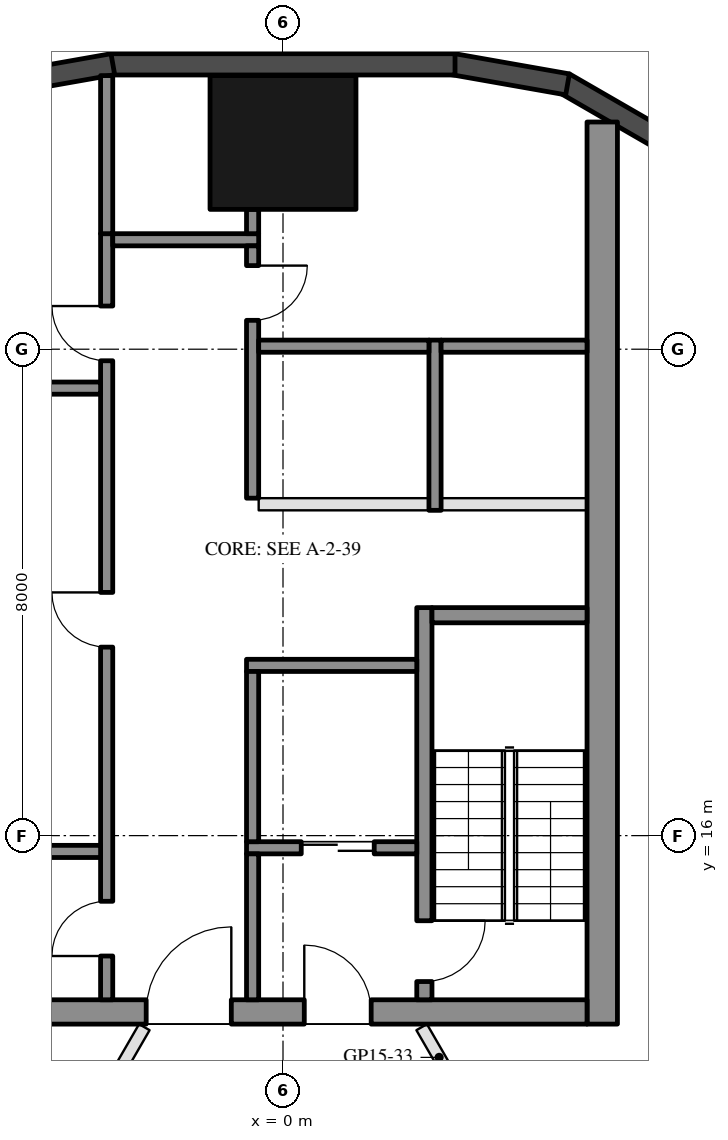
"""IFC4 building model, lengths in metres.
Left out: names, types, materials, properties, quantities, classifications, styles, units other than length and angle.
Written with IfcOpenShell. Run it as: python <this file> out.ifc"""

import sys

from ifc_helpers import new_model, si_unit, direction, frame, frame_2d, origin, origin_2d, place, context, subcontext, project, spatial, rectangle, hollow_rectangle, extrude, element, fill, save


model = new_model("IFC4")
c1 = context("Model", 3, precision=1e-05, world=origin(), true_north=direction((0.0, 1.0)))
c2 = subcontext(c1, "Body", "Model", "MODEL_VIEW")
j1 = project(units=[si_unit("LENGTHUNIT", "METRE"), si_unit("PLANEANGLEUNIT", "RADIAN")], contexts=[c1])
p1 = place(None, origin())
s1 = spatial("IfcSite", under=j1, at=p1, CompositionType="ELEMENT")
p2 = place(p1, origin())
s2 = spatial("IfcBuilding", under=s1, at=p2, CompositionType="ELEMENT")
p3 = place(p2, frame((0.0, 0.0, 168.8)))
s3 = spatial("IfcBuildingStorey", under=s2, at=p3, CompositionType="ELEMENT", Elevation=168.8)
p4 = place(p3, frame((0.0, 27.4, 0.0), z_axis=(0.0, 0.0, 1.0), x_axis=(1.0, 0.0, 0.0)))
e1 = element("IfcColumn", 1, at=p4, inside=s3, PredefinedType="COLUMN", context=c2, shape_type="SweptSolid", body=[
    extrude(hollow_rectangle(XDim=2.4, YDim=2.2, WallThickness=0.06, at=origin_2d()), origin(), (0.0, 0.0, 1.0), 3.7),
])
for number, where, z_axis, x_axis in (
    (2, (6.277, 27.422, 0.0), (0.0, 0.0, 1.0), (-0.866, 0.5, 0.0)),
    (3, (4.68, 28.356, 0.0), (0.0, 0.0, 1.0), (-0.985, 0.174, 0.0)),
):
    element("IfcWall", number, at=place(p3, frame(where, z_axis=z_axis, x_axis=x_axis)), inside=s3, PredefinedType="SOLIDWALL", context=c2, shape_type="SweptSolid", body=[
        extrude(rectangle(XDim=1.91, YDim=0.35, at=frame_2d((0.955, 0.0))), origin(), (0.0, 0.0, 1.0), 3.55),
    ])
p5 = place(p3, frame((2.829, 28.685, 0.0), z_axis=(0.0, 0.0, 1.0), x_axis=(-1.0, 0.0, 0.0)))
e4 = element("IfcWall", 4, at=p5, inside=s3, PredefinedType="SOLIDWALL", context=c2, shape_type="SweptSolid", body=[
    extrude(rectangle(XDim=5.658, YDim=0.35, at=frame_2d((2.829, 0.0))), origin(), (0.0, 0.0, 1.0), 3.55),
])
p6 = place(p3, frame((-2.799, 28.688, 0.0), z_axis=(0.0, 0.0, 1.0), x_axis=(-0.984798995425, -0.173697837091, 0.0)))
e5 = element("IfcWall", 5, at=p6, inside=s3, PredefinedType="SOLIDWALL", context=c2, shape_type="SweptSolid", body=[
    extrude(rectangle(XDim=1.91, YDim=0.35, at=frame_2d((0.955, 0.0))), origin(), (0.0, 0.0, 1.0), 3.55),
])
p7 = place(p3, frame((5.25, 12.9, 0.0), z_axis=(0.0, 0.0, 1.0), x_axis=(0.0, 1.0, 0.0)))
e6 = element("IfcWall", 6, at=p7, inside=s3, PredefinedType="SHEAR", context=c2, shape_type="SweptSolid", body=[
    extrude(rectangle(XDim=14.837, YDim=0.5, at=frame_2d((7.418, 0.0))), origin(), (0.0, 0.0, 1.0), 3.5),
])
p8 = place(p3, frame((5.0, 13.1, 0.0), z_axis=(0.0, 0.0, 1.0), x_axis=(-1.0, 0.0, 0.0)))
e7 = element("IfcWall", 7, at=p8, inside=s3, PredefinedType="SHEAR", context=c2, shape_type="SweptSolid", body=[
    extrude(rectangle(XDim=10.0, YDim=0.4, at=frame_2d((5.0, 0.0))), origin(), (0.0, 0.0, 1.0), 3.5),
])
p9 = place(p8, frame((3.55, 0.0, 0.0)))
e8 = element("IfcOpeningElement", 8, at=p9, cuts=e7, PredefinedType="OPENING", context=c2, shape_type="SweptSolid", body=[
    extrude(rectangle(XDim=1.1, YDim=2.1, at=frame_2d((0.55, 1.05))), frame((0.0, 0.21, 0.0), z_axis=(0.0, -1.0, 0.0), x_axis=(1.0, 0.0, 0.0)), (0.0, 0.0, 1.0), 0.42),
])
p10 = place(p8, frame((5.85, 0.0, 0.0)))
e9 = element("IfcOpeningElement", 9, at=p10, cuts=e7, PredefinedType="OPENING", context=c2, shape_type="SweptSolid", body=[
    extrude(rectangle(XDim=1.4, YDim=2.1, at=frame_2d((0.7, 1.05))), frame((0.0, 0.21, 0.0), z_axis=(0.0, -1.0, 0.0), x_axis=(1.0, 0.0, 0.0)), (0.0, 0.0, 1.0), 0.42),
])
p11 = place(p3, frame((2.325, 13.3, 0.0), z_axis=(0.0, 0.0, 1.0), x_axis=(0.0, 1.0, 0.0)))
e10 = element("IfcWall", 10, at=p11, inside=s3, PredefinedType="SHEAR", context=c2, shape_type="SweptSolid", body=[
    extrude(rectangle(XDim=6.45, YDim=0.25, at=frame_2d((3.225, 0.0))), origin(), (0.0, 0.0, 1.0), 3.5),
])
p12 = place(p11, frame((0.3, 0.0, 0.0)))
e11 = element("IfcOpeningElement", 11, at=p12, cuts=e10, PredefinedType="OPENING", context=c2, shape_type="SweptSolid", body=[
    extrude(rectangle(XDim=1.0, YDim=2.1, at=frame_2d((0.5, 1.05))), frame((0.0, 0.135, 0.0), z_axis=(0.0, -1.0, 0.0), x_axis=(1.0, 0.0, 0.0)), (0.0, 0.0, 1.0), 0.27),
])
p13 = place(p3, frame((5.0, 19.625, 0.0), z_axis=(0.0, 0.0, 1.0), x_axis=(-1.0, 0.0, 0.0)))
e12 = element("IfcWall", 12, at=p13, inside=s3, PredefinedType="SHEAR", context=c2, shape_type="SweptSolid", body=[
    extrude(rectangle(XDim=2.55, YDim=0.25, at=frame_2d((1.275, 0.0))), origin(), (0.0, 0.0, 1.0), 3.5),
])
p14 = place(p3, frame((2.2, 18.8, 0.0), z_axis=(0.0, 0.0, 1.0), x_axis=(-1.0, 0.0, 0.0)))
e13 = element("IfcWall", 13, at=p14, inside=s3, PredefinedType="SHEAR", context=c2, shape_type="SweptSolid", body=[
    extrude(rectangle(XDim=2.8, YDim=0.2, at=frame_2d((1.4, 0.0))), origin(), (0.0, 0.0, 1.0), 3.5),
])
p15 = place(p3, frame((2.2, 15.8, 0.0), z_axis=(0.0, 0.0, 1.0), x_axis=(-1.0, 0.0, 0.0)))
e14 = element("IfcWall", 14, at=p15, inside=s3, PredefinedType="SHEAR", context=c2, shape_type="SweptSolid", body=[
    extrude(rectangle(XDim=2.8, YDim=0.2, at=frame_2d((1.4, 0.0))), origin(), (0.0, 0.0, 1.0), 3.5),
])
p16 = place(p15, frame((0.7, 0.0, 0.0)))
e15 = element("IfcOpeningElement", 15, at=p16, cuts=e14, PredefinedType="OPENING", context=c2, shape_type="SweptSolid", body=[
    extrude(rectangle(XDim=1.2, YDim=2.1, at=frame_2d((0.6, 1.05))), frame((0.0, 0.11, 0.0), z_axis=(0.0, -1.0, 0.0), x_axis=(1.0, 0.0, 0.0)), (0.0, 0.0, 1.0), 0.22),
])
p17 = place(p3, frame((-0.5, 15.9, 0.0), z_axis=(0.0, 0.0, 1.0), x_axis=(0.0, 1.0, 0.0)))
e16 = element("IfcWall", 16, at=p17, inside=s3, PredefinedType="SHEAR", context=c2, shape_type="SweptSolid", body=[
    extrude(rectangle(XDim=2.8, YDim=0.2, at=frame_2d((1.4, 0.0))), origin(), (0.0, 0.0, 1.0), 3.5),
])
p18 = place(p3, frame((-0.5, 13.3, 0.0), z_axis=(0.0, 0.0, 1.0), x_axis=(0.0, 1.0, 0.0)))
e17 = element("IfcWall", 17, at=p18, inside=s3, PredefinedType="SHEAR", context=c2, shape_type="SweptSolid", body=[
    extrude(rectangle(XDim=2.4, YDim=0.2, at=frame_2d((1.2, 0.0))), origin(), (0.0, 0.0, 1.0), 3.5),
])
p19 = place(p3, frame((-2.9, 13.3, 0.0), z_axis=(0.0, 0.0, 1.0), x_axis=(0.0, 1.0, 0.0)))
e18 = element("IfcWall", 18, at=p19, inside=s3, PredefinedType="SHEAR", context=c2, shape_type="SweptSolid", body=[
    extrude(rectangle(XDim=12.6, YDim=0.2, at=frame_2d((6.3, 0.0))), origin(), (0.0, 0.0, 1.0), 3.5),
])
p20 = place(p19, frame((0.72, 0.0, 0.0)))
e19 = element("IfcOpeningElement", 19, at=p20, cuts=e18, PredefinedType="OPENING", context=c2, shape_type="SweptSolid", body=[
    extrude(rectangle(XDim=0.9, YDim=2.1, at=frame_2d((0.45, 1.05))), frame((0.0, 0.11, 0.0), z_axis=(0.0, -1.0, 0.0), x_axis=(1.0, 0.0, 0.0)), (0.0, 0.0, 1.0), 0.22),
])
p21 = place(p19, frame((5.8, 0.0, 0.0)))
e20 = element("IfcOpeningElement", 20, at=p21, cuts=e18, PredefinedType="OPENING", context=c2, shape_type="SweptSolid", body=[
    extrude(rectangle(XDim=0.9, YDim=2.1, at=frame_2d((0.45, 1.05))), frame((0.0, 0.11, 0.0), z_axis=(0.0, -1.0, 0.0), x_axis=(1.0, 0.0, 0.0)), (0.0, 0.0, 1.0), 0.22),
])
p22 = place(p19, frame((10.51, 0.0, 0.0)))
e21 = element("IfcOpeningElement", 21, at=p22, cuts=e18, PredefinedType="OPENING", context=c2, shape_type="SweptSolid", body=[
    extrude(rectangle(XDim=0.9, YDim=2.1, at=frame_2d((0.45, 1.05))), frame((0.0, 0.11, 0.0), z_axis=(0.0, -1.0, 0.0), x_axis=(1.0, 0.0, 0.0)), (0.0, 0.0, 1.0), 0.22),
])
p23 = place(p3, frame((-0.4, 25.8, 0.0), z_axis=(0.0, 0.0, 1.0), x_axis=(-1.0, 0.0, 0.0)))
e22 = element("IfcWall", 22, at=p23, inside=s3, PredefinedType="SHEAR", context=c2, shape_type="SweptSolid", body=[
    extrude(rectangle(XDim=2.4, YDim=0.2, at=frame_2d((1.2, 0.0))), origin(), (0.0, 0.0, 1.0), 3.5),
])
p24 = place(p3, frame((-0.5, 21.55, 0.0), z_axis=(0.0, 0.0, 1.0), x_axis=(0.0, 1.0, 0.0)))
e23 = element("IfcWall", 23, at=p24, inside=s3, PredefinedType="SHEAR", context=c2, shape_type="SweptSolid", body=[
    extrude(rectangle(XDim=4.15, YDim=0.2, at=frame_2d((2.075, 0.0))), origin(), (0.0, 0.0, 1.0), 3.5),
])
p25 = place(p24, frame((2.925, 0.0, 0.0)))
e24 = element("IfcOpeningElement", 24, at=p25, cuts=e23, PredefinedType="OPENING", context=c2, shape_type="SweptSolid", body=[
    extrude(rectangle(XDim=0.9, YDim=2.1, at=frame_2d((0.45, 1.05))), frame((0.0, 0.11, 0.0), z_axis=(0.0, -1.0, 0.0), x_axis=(1.0, 0.0, 0.0)), (0.0, 0.0, 1.0), 0.22),
])
for number, where, z_axis, x_axis in (
    (25, (-3.0, 15.74, 0.0), (0.0, 0.0, 1.0), (-1.0, 0.0, 0.0)),
    (26, (-3.0, 23.36, 0.0), (0.0, 0.0, 1.0), (-1.0, 0.0, 0.0)),
):
    element("IfcWall", number, at=place(p3, frame(where, z_axis=z_axis, x_axis=x_axis)), inside=s3, PredefinedType="SHEAR", context=c2, shape_type="SweptSolid", body=[
        extrude(rectangle(XDim=2.0, YDim=0.2, at=frame_2d((1.0, 0.0))), origin(), (0.0, 0.0, 1.0), 3.5),
    ])
p26 = place(p3, frame((-0.5, 25.9, 0.0), z_axis=(0.0, 0.0, 1.0), x_axis=(0.0, 1.0, 0.0)))
e27 = element("IfcWall", 27, at=p26, inside=s3, PredefinedType="SHEAR", context=c2, shape_type="SweptSolid", body=[
    extrude(rectangle(XDim=0.4, YDim=0.2, at=frame_2d((0.2, 0.0))), origin(), (0.0, 0.0, 1.0), 3.5),
])
p27 = place(p3, frame((-2.9, 25.9, 0.0), z_axis=(0.0, 0.0, 1.0), x_axis=(0.0, 1.0, 0.0)))
e28 = element("IfcWall", 28, at=p27, inside=s3, PredefinedType="SHEAR", context=c2, shape_type="SweptSolid", body=[
    extrude(rectangle(XDim=2.6, YDim=0.2, at=frame_2d((1.3, 0.0))), origin(), (0.0, 0.0, 1.0), 3.5),
])
p28 = place(p3, frame((2.5, 21.35, 0.0), z_axis=(0.0, 0.0, 1.0), x_axis=(0.0, 1.0, 0.0)))
e29 = element("IfcWall", 29, at=p28, inside=s3, PredefinedType="SHEAR", context=c2, shape_type="SweptSolid", body=[
    extrude(rectangle(XDim=2.8, YDim=0.2, at=frame_2d((1.4, 0.0))), origin(), (0.0, 0.0, 1.0), 3.5),
])
p29 = place(p3, frame((5.0, 24.05, 0.0), z_axis=(0.0, 0.0, 1.0), x_axis=(-1.0, 0.0, 0.0)))
e30 = element("IfcWall", 30, at=p29, inside=s3, PredefinedType="SHEAR", context=c2, shape_type="SweptSolid", body=[
    extrude(rectangle(XDim=2.4, YDim=0.2, at=frame_2d((1.2, 0.0))), origin(), (0.0, 0.0, 1.0), 3.5),
])
p30 = place(p3, frame((2.4, 24.05, 0.0), z_axis=(0.0, 0.0, 1.0), x_axis=(-1.0, 0.0, 0.0)))
e31 = element("IfcWall", 31, at=p30, inside=s3, PredefinedType="SHEAR", context=c2, shape_type="SweptSolid", body=[
    extrude(rectangle(XDim=2.8, YDim=0.2, at=frame_2d((1.4, 0.0))), origin(), (0.0, 0.0, 1.0), 3.5),
])
p31 = place(p3, frame((5.0, 21.45, 0.0), z_axis=(0.0, 0.0, 1.0), x_axis=(-1.0, 0.0, 0.0)))
e32 = element("IfcWall", 32, at=p31, inside=s3, PredefinedType="PARTITIONING", context=c2, shape_type="SweptSolid", body=[
    extrude(rectangle(XDim=2.4, YDim=0.2, at=frame_2d((1.2, 0.0))), origin(), (0.0, 0.0, 1.0), 3.5),
])
p32 = place(p3, frame((2.4, 21.45, 0.0), z_axis=(0.0, 0.0, 1.0), x_axis=(-1.0, 0.0, 0.0)))
e33 = element("IfcWall", 33, at=p32, inside=s3, PredefinedType="PARTITIONING", context=c2, shape_type="SweptSolid", body=[
    extrude(rectangle(XDim=2.8, YDim=0.2, at=frame_2d((1.4, 0.0))), origin(), (0.0, 0.0, 1.0), 3.5),
])
p33 = place(p3, frame((14.402, 13.615, 0.0), z_axis=(0.0, 0.0, 1.0), x_axis=(-0.888691893785, -0.458504872299, 0.0)))
e34 = element("IfcWall", 34, at=p33, inside=s3, PredefinedType="PARTITIONING", context=c2, shape_type="SweptSolid", body=[
    extrude(rectangle(XDim=10.992, YDim=0.2, at=frame_2d((5.496, 0.0))), origin(), (0.0, 0.0, 1.0), 3.06),
])
p34 = place(p3, frame((2.281, 12.85, 0.0), z_axis=(0.0, 0.0, 1.0), x_axis=(0.499981649923, -0.866035997947, 0.0)))
e35 = element("IfcWall", 35, at=p34, inside=s3, PredefinedType="PARTITIONING", context=c2, shape_type="SweptSolid", body=[
    extrude(rectangle(XDim=4.783, YDim=0.2, at=frame_2d((2.392, 0.0))), origin(), (0.0, 0.0, 1.0), 2.95),
])
p35 = place(p34, frame((1.892, 0.0, 0.0)))
e36 = element("IfcOpeningElement", 36, at=p35, cuts=e35, PredefinedType="OPENING", context=c2, shape_type="SweptSolid", body=[
    extrude(rectangle(XDim=1.0, YDim=2.1, at=frame_2d((0.5, 1.05))), frame((0.0, 0.11, 0.0), z_axis=(0.0, -1.0, 0.0), x_axis=(1.0, 0.0, 0.0)), (0.0, 0.0, 1.0), 0.22),
])
p36 = place(p3, frame((-4.472, 9.054, 0.0), z_axis=(0.0, 0.0, 1.0), x_axis=(0.499973180286, 0.8660408876, 0.0)))
e37 = element("IfcWall", 37, at=p36, inside=s3, PredefinedType="PARTITIONING", context=c2, shape_type="SweptSolid", body=[
    extrude(rectangle(XDim=4.383, YDim=0.2, at=frame_2d((2.191, 0.0))), origin(), (0.0, 0.0, 1.0), 2.95),
])
p37 = place(p36, frame((1.691, 0.0, 0.0)))
e38 = element("IfcOpeningElement", 38, at=p37, cuts=e37, PredefinedType="OPENING", context=c2, shape_type="SweptSolid", body=[
    extrude(rectangle(XDim=1.0, YDim=2.1, at=frame_2d((0.5, 1.05))), frame((0.0, 0.11, 0.0), z_axis=(0.0, -1.0, 0.0), x_axis=(1.0, 0.0, 0.0)), (0.0, 0.0, 1.0), 0.22),
])
p38 = place(p16, origin())
e39 = element("IfcDoor", 39, at=p38, inside=s3, OperationType="DOUBLE_DOOR_SLIDING", PredefinedType="DOOR", context=c2, shape_type="SweptSolid", body=[
    extrude(rectangle(XDim=1.2, YDim=2.1, at=frame_2d((0.6, 1.05))), frame((0.0, 0.025, 0.0), z_axis=(0.0, -1.0, 0.0), x_axis=(1.0, 0.0, 0.0)), (0.0, 0.0, 1.0), 0.05),
])
fill(e15, e39)
p39 = place(p20, origin())
e40 = element("IfcDoor", 40, at=p39, inside=s3, OperationType="SINGLE_SWING_LEFT", PredefinedType="DOOR", context=c2, shape_type="SweptSolid", body=[
    extrude(rectangle(XDim=0.9, YDim=2.1, at=frame_2d((0.45, 1.05))), frame((0.0, 0.025, 0.0), z_axis=(0.0, -1.0, 0.0), x_axis=(1.0, 0.0, 0.0)), (0.0, 0.0, 1.0), 0.05),
])
fill(e19, e40)
p40 = place(p21, origin())
e41 = element("IfcDoor", 41, at=p40, inside=s3, OperationType="SINGLE_SWING_RIGHT", PredefinedType="DOOR", context=c2, shape_type="SweptSolid", body=[
    extrude(rectangle(XDim=0.9, YDim=2.1, at=frame_2d((0.45, 1.05))), frame((0.0, 0.025, 0.0), z_axis=(0.0, -1.0, 0.0), x_axis=(1.0, 0.0, 0.0)), (0.0, 0.0, 1.0), 0.05),
])
fill(e20, e41)
p41 = place(p22, origin())
e42 = element("IfcDoor", 42, at=p41, inside=s3, OperationType="SINGLE_SWING_RIGHT", PredefinedType="DOOR", context=c2, shape_type="SweptSolid", body=[
    extrude(rectangle(XDim=0.9, YDim=2.1, at=frame_2d((0.45, 1.05))), frame((0.0, 0.025, 0.0), z_axis=(0.0, -1.0, 0.0), x_axis=(1.0, 0.0, 0.0)), (0.0, 0.0, 1.0), 0.05),
])
fill(e21, e42)
p42 = place(p25, frame((0.9, 0.0, 0.0), z_axis=(0.0, 0.0, 1.0), x_axis=(-1.0, 0.0, 0.0)))
e43 = element("IfcDoor", 43, at=p42, inside=s3, OperationType="SINGLE_SWING_LEFT", PredefinedType="DOOR", context=c2, shape_type="SweptSolid", body=[
    extrude(rectangle(XDim=0.9, YDim=2.1, at=frame_2d((0.45, 1.05))), frame((0.0, 0.025, 0.0), z_axis=(0.0, -1.0, 0.0), x_axis=(1.0, 0.0, 0.0)), (0.0, 0.0, 1.0), 0.05),
])
fill(e24, e43)
p43 = place(p9, frame((1.1, 0.0, 0.0), z_axis=(0.0, 0.0, 1.0), x_axis=(-1.0, 0.0, 0.0)))
e44 = element("IfcDoor", 44, at=p43, inside=s3, OperationType="SINGLE_SWING_LEFT", PredefinedType="DOOR", context=c2, shape_type="SweptSolid", body=[
    extrude(rectangle(XDim=1.1, YDim=2.1, at=frame_2d((0.55, 1.05))), frame((0.0, 0.025, 0.0), z_axis=(0.0, -1.0, 0.0), x_axis=(1.0, 0.0, 0.0)), (0.0, 0.0, 1.0), 0.05),
])
fill(e8, e44)
p44 = place(p10, frame((1.4, 0.0, 0.0), z_axis=(0.0, 0.0, 1.0), x_axis=(-1.0, 0.0, 0.0)))
e45 = element("IfcDoor", 45, at=p44, inside=s3, OperationType="DOUBLE_DOOR_SINGLE_SWING", PredefinedType="DOOR", context=c2, shape_type="SweptSolid", body=[
    extrude(rectangle(XDim=1.4, YDim=2.1, at=frame_2d((0.7, 1.05))), frame((0.0, 0.025, 0.0), z_axis=(0.0, -1.0, 0.0), x_axis=(1.0, 0.0, 0.0)), (0.0, 0.0, 1.0), 0.05),
])
fill(e9, e45)
p45 = place(p12, frame((1.0, 0.0, 0.0), z_axis=(0.0, 0.0, 1.0), x_axis=(-1.0, 0.0, 0.0)))
e46 = element("IfcDoor", 46, at=p45, inside=s3, OperationType="SINGLE_SWING_LEFT", PredefinedType="DOOR", context=c2, shape_type="SweptSolid", body=[
    extrude(rectangle(XDim=1.0, YDim=2.1, at=frame_2d((0.5, 1.05))), frame((0.0, 0.025, 0.0), z_axis=(0.0, -1.0, 0.0), x_axis=(1.0, 0.0, 0.0)), (0.0, 0.0, 1.0), 0.05),
])
fill(e11, e46)
save(model, sys.argv[1])
